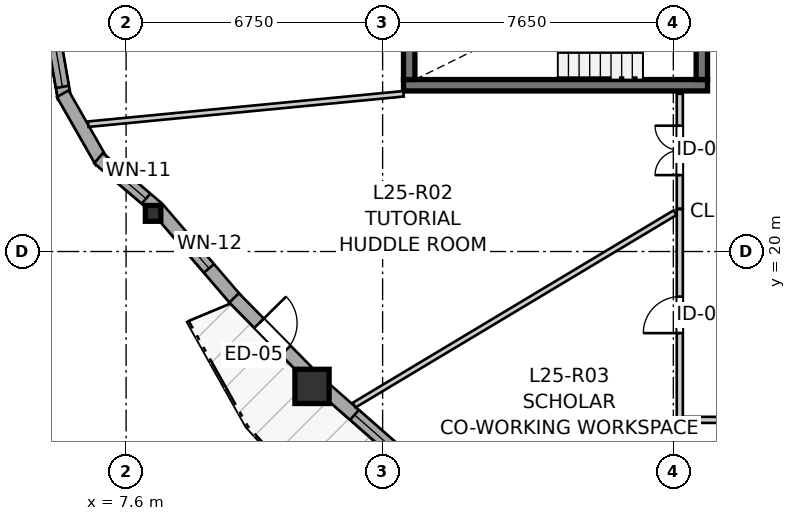
"""IFC4 building model, lengths in metres.
Left out: names, types, materials, properties, quantities, classifications, styles, units other than length and angle.
Written with IfcOpenShell. Run it as: python <this file> out.ifc"""

import sys

from ifc_helpers import new_model, si_unit, direction, frame, frame_2d, origin, origin_2d, place, context, subcontext, project, spatial, rectangle, i_section, extrude, source, transform, mapped, element, fill, save


model = new_model("IFC4")
c1 = context("Model", 3, precision=1e-05, world=origin(), true_north=direction((0.0, 1.0)))
c2 = subcontext(c1, "Body", "Model", "MODEL_VIEW")
j1 = project(units=[si_unit("LENGTHUNIT", "METRE"), si_unit("PLANEANGLEUNIT", "RADIAN")], contexts=[c1])
p1 = place(None, origin())
s1 = spatial("IfcSite", under=j1, at=p1, CompositionType="ELEMENT")
p2 = place(p1, origin())
s2 = spatial("IfcBuilding", under=s1, at=p2, CompositionType="ELEMENT")
p3 = place(p2, frame((0.0, 0.0, 86.4)))
s3 = spatial("IfcBuildingStorey", under=s2, at=p3, CompositionType="ELEMENT", Elevation=86.4)
p4 = place(p3, frame((14.9, 24.375, 0.0), z_axis=(0.0, 0.0, 1.0), x_axis=(1.0, 0.0, 0.0)))
e1 = element("IfcWall", 1, at=p4, inside=s3, PredefinedType="SHEAR", context=c2, shape_type="SweptSolid", body=[
    extrude(rectangle(XDim=8.0, YDim=0.3, at=frame_2d((4.0, 0.0))), origin(), (0.0, 0.0, 1.0), 2.95),
])
p5 = place(p3, frame((15.05, 27.475, 0.0), z_axis=(0.0, 0.0, 1.0), x_axis=(0.0, -1.0, 0.0)))
e2 = element("IfcWall", 2, at=p5, inside=s3, PredefinedType="SHEAR", context=c2, shape_type="SweptSolid", body=[
    extrude(rectangle(XDim=2.95, YDim=0.3, at=frame_2d((1.475, 0.0))), origin(), (0.0, 0.0, 1.0), 2.95),
])
p6 = place(p3, frame((22.75, 24.525, 0.0), z_axis=(0.0, 0.0, 1.0), x_axis=(0.0, 1.0, 0.0)))
e3 = element("IfcWall", 3, at=p6, inside=s3, PredefinedType="SHEAR", context=c2, shape_type="SweptSolid", body=[
    extrude(rectangle(XDim=2.95, YDim=0.3, at=frame_2d((1.475, 0.0))), origin(), (0.0, 0.0, 1.0), 2.95),
])
p7 = place(p6, frame((0.985, 0.0, 0.0)))
e4 = element("IfcOpeningElement", 4, at=p7, cuts=e3, PredefinedType="OPENING", context=c2, shape_type="SweptSolid", body=[
    extrude(rectangle(XDim=0.98, YDim=2.15, at=frame_2d((0.49, 1.075))), frame((0.0, 0.16, 0.0), z_axis=(0.0, -1.0, 0.0), x_axis=(1.0, 0.0, 0.0)), (0.0, 0.0, 1.0), 0.32),
])
m1 = source(origin(), c2, "Body", "SweptSolid", [
    extrude(i_section(OverallWidth=0.406, OverallDepth=0.416, WebThickness=0.027, FlangeThickness=0.044, FilletRadius=0.015, at=origin_2d()), origin(), (0.0, 0.0, 1.0), 2.95),
])
p8 = place(p3, frame((8.31, 21.004, 0.0), z_axis=(0.0, 0.0, 1.0), x_axis=(1.0, 0.0, 0.0)))
e5 = element("IfcColumn", 5, at=p8, inside=s3, PredefinedType="PILASTER", context=c2, shape_type="MappedRepresentation", body=[
    mapped(m1, transform((0.0, 0.0, 0.0), x_axis=(1.0, 0.0, 0.0), y_axis=(0.0, 1.0, 0.0), z_axis=(0.0, 0.0, 1.0), scale=1.0)),
])
m2 = source(origin(), c2, "Body", "SweptSolid", [
    extrude(rectangle(XDim=0.9, YDim=0.9, at=origin_2d()), origin(), (0.0, 0.0, 1.0), 2.95),
])
p9 = place(p3, frame((12.493, 16.451, 0.0), z_axis=(0.0, 0.0, 1.0), x_axis=(1.0, 0.0, 0.0)))
e6 = element("IfcColumn", 6, at=p9, inside=s3, PredefinedType="COLUMN", context=c2, shape_type="MappedRepresentation", body=[
    mapped(m2, transform((0.0, 0.0, 0.0), x_axis=(1.0, 0.0, 0.0), y_axis=(0.0, 1.0, 0.0), z_axis=(0.0, 0.0, 1.0), scale=1.0)),
])
p10 = place(p3, frame((5.622, 26.068, 0.0), z_axis=(0.0, 0.0, 1.0), x_axis=(0.172166087538, -0.985067935881, 0.0)))
e7 = element("IfcWall", 7, at=p10, inside=s3, PredefinedType="SOLIDWALL", context=c2, shape_type="SweptSolid", body=[
    extrude(rectangle(XDim=2.073, YDim=0.35, at=frame_2d((1.037, 0.0))), origin(), (0.0, 0.0, 1.0), 2.48),
])
p11 = place(p10, frame((0.312, 0.0, 0.82)))
e8 = element("IfcOpeningElement", 8, at=p11, cuts=e7, PredefinedType="OPENING", context=c2, shape_type="SweptSolid", body=[
    extrude(rectangle(XDim=1.45, YDim=1.25, at=frame_2d((0.725, 0.625))), frame((0.0, 0.185, 0.0), z_axis=(0.0, -1.0, 0.0), x_axis=(1.0, 0.0, 0.0)), (0.0, 0.0, 1.0), 0.37),
])
p12 = place(p3, frame((5.933, 24.153, 0.0), z_axis=(0.0, 0.0, 1.0), x_axis=(0.496037473582, -0.868301114132, 0.0)))
e9 = element("IfcWall", 9, at=p12, inside=s3, PredefinedType="SOLIDWALL", context=c2, shape_type="SweptSolid", body=[
    extrude(rectangle(XDim=2.073, YDim=0.35, at=frame_2d((1.037, 0.0))), origin(), (0.0, 0.0, 1.0), 2.48),
])
p13 = place(p3, frame((6.875, 22.457, 0.0), z_axis=(0.0, 0.0, 1.0), x_axis=(0.761203352049, -0.648513266502, 0.0)))
e10 = element("IfcWall", 10, at=p13, inside=s3, PredefinedType="SOLIDWALL", context=c2, shape_type="SweptSolid", body=[
    extrude(rectangle(XDim=2.015, YDim=0.35, at=frame_2d((1.007, 0.0))), origin(), (0.0, 0.0, 1.0), 2.48),
])
p14 = place(p13, frame((0.393, 0.0, 0.82)))
e11 = element("IfcOpeningElement", 11, at=p14, cuts=e10, PredefinedType="OPENING", context=c2, shape_type="SweptSolid", body=[
    extrude(rectangle(XDim=1.25, YDim=1.35, at=frame_2d((0.625, 0.675))), frame((0.0, 0.185, 0.0), z_axis=(0.0, -1.0, 0.0), x_axis=(1.0, 0.0, 0.0)), (0.0, 0.0, 1.0), 0.37),
])
p15 = place(p3, frame((8.456, 21.102, 0.0), z_axis=(0.0, 0.0, 1.0), x_axis=(0.650733809993, -0.759305938692, 0.0)))
e12 = element("IfcWall", 12, at=p15, inside=s3, PredefinedType="SOLIDWALL", context=c2, shape_type="SweptSolid", body=[
    extrude(rectangle(XDim=3.144, YDim=0.35, at=frame_2d((1.572, 0.0))), origin(), (0.0, 0.0, 1.0), 2.48),
])
p16 = place(p15, frame((1.087, 0.0, 0.82)))
e13 = element("IfcOpeningElement", 13, at=p16, cuts=e12, PredefinedType="OPENING", context=c2, shape_type="SweptSolid", body=[
    extrude(rectangle(XDim=0.95, YDim=1.35, at=frame_2d((0.475, 0.675))), frame((0.0, 0.185, 0.0), z_axis=(0.0, -1.0, 0.0), x_axis=(1.0, 0.0, 0.0)), (0.0, 0.0, 1.0), 0.37),
])
p17 = place(p3, frame((10.442, 18.78, 0.0), z_axis=(0.0, 0.0, 1.0), x_axis=(0.7019473345, -0.712228853381, 0.0)))
e14 = element("IfcWall", 14, at=p17, inside=s3, PredefinedType="SOLIDWALL", context=c2, shape_type="SweptSolid", body=[
    extrude(rectangle(XDim=2.873, YDim=0.35, at=frame_2d((1.437, 0.0))), origin(), (0.0, 0.0, 1.0), 2.48),
])
p18 = place(p17, frame((0.937, 0.0, 0.0)))
e15 = element("IfcOpeningElement", 15, at=p18, cuts=e14, PredefinedType="OPENING", context=c2, shape_type="SweptSolid", body=[
    extrude(rectangle(XDim=1.0, YDim=2.1, at=frame_2d((0.5, 1.05))), frame((0.0, 0.185, 0.0), z_axis=(0.0, -1.0, 0.0), x_axis=(1.0, 0.0, 0.0)), (0.0, 0.0, 1.0), 0.37),
])
p19 = place(p3, frame((12.777, 16.434, 0.0), z_axis=(0.0, 0.0, 1.0), x_axis=(0.751531192513, -0.659697556976, 0.0)))
e16 = element("IfcWall", 16, at=p19, inside=s3, PredefinedType="SOLIDWALL", context=c2, shape_type="SweptSolid", body=[
    extrude(rectangle(XDim=2.823, YDim=0.35, at=frame_2d((1.412, 0.0))), origin(), (0.0, 0.0, 1.0), 2.48),
])
p20 = place(p19, frame((1.11, 0.0, 0.82)))
e17 = element("IfcOpeningElement", 17, at=p20, cuts=e16, PredefinedType="OPENING", context=c2, shape_type="SweptSolid", body=[
    extrude(rectangle(XDim=1.45, YDim=1.25, at=frame_2d((0.725, 0.625))), frame((0.0, 0.185, 0.0), z_axis=(0.0, -1.0, 0.0), x_axis=(1.0, 0.0, 0.0)), (0.0, 0.0, 1.0), 0.37),
])
p21 = place(p3, frame((22.17, 15.57, 0.0), z_axis=(0.0, 0.0, 1.0), x_axis=(0.0, 1.0, 0.0)))
e18 = element("IfcWall", 18, at=p21, inside=s3, PredefinedType="PARTITIONING", context=c2, shape_type="SweptSolid", body=[
    extrude(rectangle(XDim=5.543, YDim=0.16, at=frame_2d((2.771, 0.0))), origin(), (0.0, 0.0, 1.0), 2.95),
])
p22 = place(p21, frame((2.283, 0.0, 0.0)))
e19 = element("IfcOpeningElement", 19, at=p22, cuts=e18, PredefinedType="OPENING", context=c2, shape_type="SweptSolid", body=[
    extrude(rectangle(XDim=0.96, YDim=2.1, at=frame_2d((0.48, 1.05))), frame((0.0, 0.09, 0.0), z_axis=(0.0, -1.0, 0.0), x_axis=(1.0, 0.0, 0.0)), (0.0, 0.0, 1.0), 0.18),
])
p23 = place(p3, frame((22.17, 21.128, 0.0), z_axis=(0.0, 0.0, 1.0), x_axis=(0.0, 1.0, 0.0)))
e20 = element("IfcWall", 20, at=p23, inside=s3, PredefinedType="PARTITIONING", context=c2, shape_type="SweptSolid", body=[
    extrude(rectangle(XDim=3.022, YDim=0.16, at=frame_2d((1.511, 0.0))), origin(), (0.0, 0.0, 1.0), 2.95),
])
p24 = place(p23, frame((0.883, 0.0, 0.0)))
e21 = element("IfcOpeningElement", 21, at=p24, cuts=e20, PredefinedType="OPENING", context=c2, shape_type="SweptSolid", body=[
    extrude(rectangle(XDim=1.3, YDim=2.1, at=frame_2d((0.65, 1.05))), frame((0.0, 0.09, 0.0), z_axis=(0.0, -1.0, 0.0), x_axis=(1.0, 0.0, 0.0)), (0.0, 0.0, 1.0), 0.18),
])
p25 = place(p3, frame((13.601, 15.958, 0.0), z_axis=(0.0, 0.0, 1.0), x_axis=(0.857661345212, 0.514214952066, 0.0)))
e22 = element("IfcWall", 22, at=p25, inside=s3, PredefinedType="PARTITIONING", context=c2, shape_type="SweptSolid", body=[
    extrude(rectangle(XDim=9.846, YDim=0.145, at=frame_2d((4.923, 0.0))), origin(), (0.0, 0.0, 1.0), 2.95),
])
p26 = place(p3, frame((6.605, 23.351, 0.0), z_axis=(0.0, 0.0, 1.0), x_axis=(0.995388985265, 0.09592063393, 0.0)))
e23 = element("IfcWall", 23, at=p26, inside=s3, PredefinedType="PARTITIONING", context=c2, shape_type="SweptSolid", body=[
    extrude(rectangle(XDim=8.333, YDim=0.145, at=frame_2d((4.167, 0.0))), origin(), (0.0, 0.0, 1.0), 2.95),
])
p27 = place(p3, frame((23.186, 9.634, 0.0), z_axis=(0.0, 0.0, 1.0), x_axis=(0.400994208685, 0.916080588486, 0.0)))
e24 = element("IfcWall", 24, at=p27, inside=s3, PredefinedType="PARTITIONING", context=c2, shape_type="SweptSolid", body=[
    extrude(rectangle(XDim=6.353, YDim=0.145, at=frame_2d((3.177, 0.0))), origin(), (0.0, 0.0, 1.0), 2.95),
])
p28 = place(p3, frame((22.258, 15.57, 0.0), z_axis=(0.0, 0.0, 1.0), x_axis=(1.0, 0.0, 0.0)))
e25 = element("IfcWall", 25, at=p28, inside=s3, PredefinedType="PARTITIONING", context=c2, shape_type="SweptSolid", body=[
    extrude(rectangle(XDim=3.373, YDim=0.16, at=frame_2d((1.687, 0.0))), origin(), (0.0, 0.0, 1.0), 2.95),
])
m3 = source(origin(), c2, "Body", "SweptSolid", [
    extrude(rectangle(XDim=1.45, YDim=1.25, at=frame_2d((0.725, 0.625))), frame((0.0, 0.03, 0.0), z_axis=(0.0, -1.0, 0.0), x_axis=(1.0, 0.0, 0.0)), (0.0, 0.0, 1.0), 0.06),
])
p29 = place(p11, origin())
e26 = element("IfcWindow", 26, at=p29, inside=s3, PartitioningType="SINGLE_PANEL", PredefinedType="WINDOW", context=c2, shape_type="MappedRepresentation", body=[
    mapped(m3, transform((0.0, 0.0, 0.0), x_axis=(1.0, 0.0, 0.0), y_axis=(0.0, 1.0, 0.0), z_axis=(0.0, 0.0, 1.0), scale=1.0)),
])
fill(e8, e26)
m4 = source(origin(), c2, "Body", "SweptSolid", [
    extrude(rectangle(XDim=1.25, YDim=1.35, at=frame_2d((0.625, 0.675))), frame((0.0, 0.03, 0.0), z_axis=(0.0, -1.0, 0.0), x_axis=(1.0, 0.0, 0.0)), (0.0, 0.0, 1.0), 0.06),
])
p30 = place(p14, origin())
e27 = element("IfcWindow", 27, at=p30, inside=s3, PartitioningType="SINGLE_PANEL", PredefinedType="WINDOW", context=c2, shape_type="MappedRepresentation", body=[
    mapped(m4, transform((0.0, 0.0, 0.0), x_axis=(1.0, 0.0, 0.0), y_axis=(0.0, 1.0, 0.0), z_axis=(0.0, 0.0, 1.0), scale=1.0)),
])
fill(e11, e27)
m5 = source(origin(), c2, "Body", "SweptSolid", [
    extrude(rectangle(XDim=0.95, YDim=1.35, at=frame_2d((0.475, 0.675))), frame((0.0, 0.03, 0.0), z_axis=(0.0, -1.0, 0.0), x_axis=(1.0, 0.0, 0.0)), (0.0, 0.0, 1.0), 0.06),
])
p31 = place(p16, origin())
e28 = element("IfcWindow", 28, at=p31, inside=s3, PartitioningType="SINGLE_PANEL", PredefinedType="WINDOW", context=c2, shape_type="MappedRepresentation", body=[
    mapped(m5, transform((0.0, 0.0, 0.0), x_axis=(1.0, 0.0, 0.0), y_axis=(0.0, 1.0, 0.0), z_axis=(0.0, 0.0, 1.0), scale=1.0)),
])
fill(e13, e28)
p32 = place(p20, origin())
e29 = element("IfcWindow", 29, at=p32, inside=s3, PartitioningType="SINGLE_PANEL", PredefinedType="WINDOW", context=c2, shape_type="MappedRepresentation", body=[
    mapped(m3, transform((0.0, 0.0, 0.0), x_axis=(1.0, 0.0, 0.0), y_axis=(0.0, 1.0, 0.0), z_axis=(0.0, 0.0, 1.0), scale=1.0)),
])
fill(e17, e29)
m6 = source(origin(), c2, "Body", "SweptSolid", [
    extrude(rectangle(XDim=1.0, YDim=2.1, at=frame_2d((0.5, 1.05))), frame((0.0, 0.025, 0.0), z_axis=(0.0, -1.0, 0.0), x_axis=(1.0, 0.0, 0.0)), (0.0, 0.0, 1.0), 0.05),
])
p33 = place(p18, origin())
e30 = element("IfcDoor", 30, at=p33, inside=s3, OperationType="SINGLE_SWING_LEFT", PredefinedType="DOOR", context=c2, shape_type="MappedRepresentation", body=[
    mapped(m6, transform((0.0, 0.0, 0.0), x_axis=(1.0, 0.0, 0.0), y_axis=(0.0, 1.0, 0.0), z_axis=(0.0, 0.0, 1.0), scale=1.0)),
])
fill(e15, e30)
m7 = source(origin(), c2, "Body", "SweptSolid", [
    extrude(rectangle(XDim=0.96, YDim=2.1, at=frame_2d((0.48, 1.05))), frame((0.0, 0.025, 0.0), z_axis=(0.0, -1.0, 0.0), x_axis=(1.0, 0.0, 0.0)), (0.0, 0.0, 1.0), 0.05),
])
p34 = place(p22, origin())
e31 = element("IfcDoor", 31, at=p34, inside=s3, OperationType="SINGLE_SWING_LEFT", PredefinedType="DOOR", context=c2, shape_type="MappedRepresentation", body=[
    mapped(m7, transform((0.0, 0.0, 0.0), x_axis=(1.0, 0.0, 0.0), y_axis=(0.0, 1.0, 0.0), z_axis=(0.0, 0.0, 1.0), scale=1.0)),
])
fill(e19, e31)
m8 = source(origin(), c2, "Body", "SweptSolid", [
    extrude(rectangle(XDim=1.3, YDim=2.1, at=frame_2d((0.65, 1.05))), frame((0.0, 0.025, 0.0), z_axis=(0.0, -1.0, 0.0), x_axis=(1.0, 0.0, 0.0)), (0.0, 0.0, 1.0), 0.05),
])
p35 = place(p24, origin())
e32 = element("IfcDoor", 32, at=p35, inside=s3, OperationType="DOUBLE_DOOR_SINGLE_SWING", PredefinedType="DOOR", context=c2, shape_type="MappedRepresentation", body=[
    mapped(m8, transform((0.0, 0.0, 0.0), x_axis=(1.0, 0.0, 0.0), y_axis=(0.0, 1.0, 0.0), z_axis=(0.0, 0.0, 1.0), scale=1.0)),
])
fill(e21, e32)
save(model, sys.argv[1])
